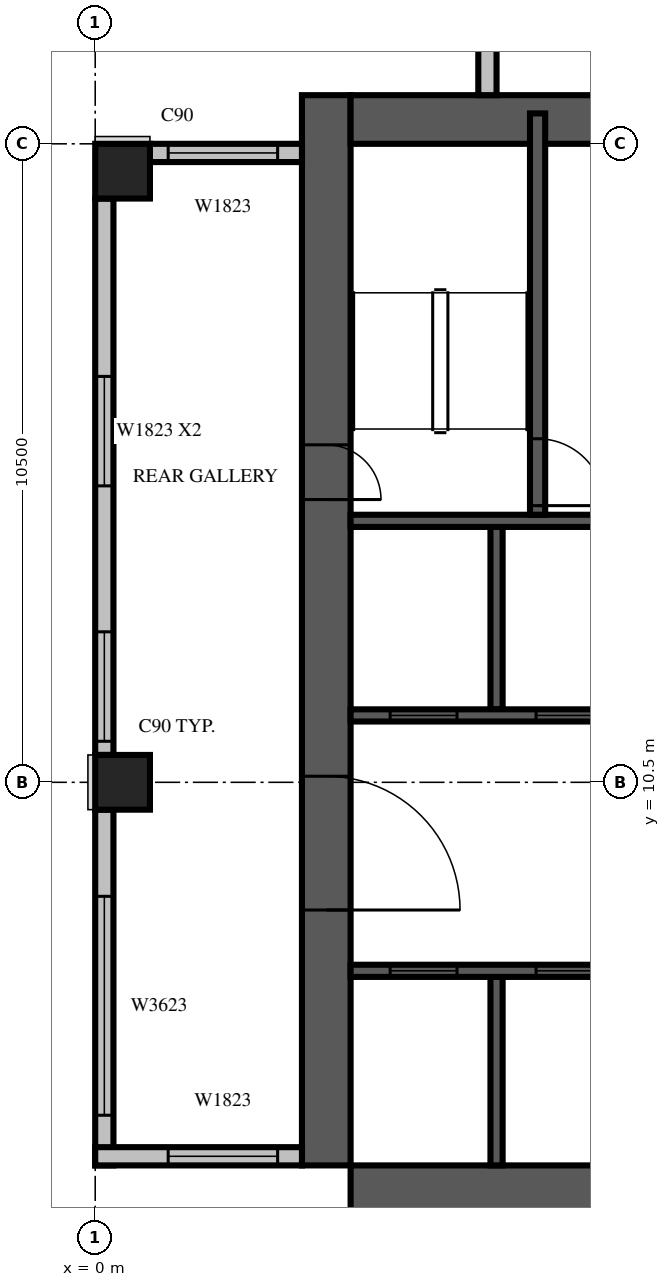
"""IFC4 building model, lengths in metres.
Left out: names, types, materials, properties, quantities, classifications, styles, units other than length and angle.
Written with IfcOpenShell. Run it as: python <this file> out.ifc"""

import sys

from ifc_helpers import new_model, si_unit, direction, frame, frame_2d, origin, origin_2d, place, context, subcontext, project, spatial, rectangle, extrude, source, transform, mapped, element, fill, save


model = new_model("IFC4")
c1 = context("Model", 3, precision=1e-05, world=origin(), true_north=direction((0.0, 1.0)))
c2 = subcontext(c1, "Body", "Model", "MODEL_VIEW")
j1 = project(units=[si_unit("LENGTHUNIT", "METRE"), si_unit("PLANEANGLEUNIT", "RADIAN")], contexts=[c1])
p1 = place(None, origin())
s1 = spatial("IfcSite", under=j1, at=p1, CompositionType="ELEMENT")
p2 = place(p1, origin())
s2 = spatial("IfcBuilding", under=s1, at=p2, CompositionType="ELEMENT")
p3 = place(p2, frame((0.0, 0.0, 181.6)))
s3 = spatial("IfcBuildingStorey", under=s2, at=p3, CompositionType="ELEMENT", Elevation=181.6)
m1 = source(origin(), c2, "Body", "SweptSolid", [
    extrude(rectangle(XDim=0.9, YDim=0.9, at=origin_2d()), origin(), (0.0, 0.0, 1.0), 3.8),
])
for number, where, z_axis, x_axis in (
    (1, (0.45, 10.5, 0.0), (0.0, 0.0, 1.0), (1.0, 0.0, 0.0)),
    (2, (0.45, 20.55, 0.0), (0.0, 0.0, 1.0), (1.0, 0.0, 0.0)),
):
    element("IfcColumn", number, at=place(p3, frame(where, z_axis=z_axis, x_axis=x_axis)), inside=s3, PredefinedType="COLUMN", context=c2, shape_type="MappedRepresentation", body=[
        mapped(m1, transform((0.0, 0.0, 0.0), scale=1.0)),
    ])
m2 = source(origin(), c2, "Body", "SweptSolid", [
    extrude(rectangle(XDim=17.6, YDim=0.8, at=frame_2d((8.8, 0.0))), origin(), (0.0, 0.0, 1.0), 3.8),
])
p4 = place(p3, frame((3.8, 4.2, 0.0), z_axis=(0.0, 0.0, 1.0), x_axis=(0.0, 1.0, 0.0)))
e3 = element("IfcWall", 3, at=p4, inside=s3, PredefinedType="SHEAR", context=c2, shape_type="MappedRepresentation", body=[
    mapped(m2, transform((0.0, 0.0, 0.0), scale=1.0)),
])
m3 = source(origin(), c2, "Body", "SweptSolid", [
    extrude(rectangle(XDim=2.2, YDim=2.1, at=frame_2d((1.1, 1.05))), frame((0.0, 0.41, 0.0), z_axis=(0.0, -1.0, 0.0), x_axis=(1.0, 0.0, 0.0)), (0.0, 0.0, 1.0), 0.82),
])
p5 = place(p4, frame((4.2, 0.0, 0.0)))
e4 = element("IfcOpeningElement", 4, at=p5, cuts=e3, PredefinedType="OPENING", context=c2, shape_type="MappedRepresentation", body=[
    mapped(m3, transform((0.0, 0.0, 0.0), scale=1.0)),
])
m4 = source(origin(), c2, "Body", "SweptSolid", [
    extrude(rectangle(XDim=0.9, YDim=2.1, at=frame_2d((0.45, 1.05))), frame((0.0, 0.41, 0.0), z_axis=(0.0, -1.0, 0.0), x_axis=(1.0, 0.0, 0.0)), (0.0, 0.0, 1.0), 0.82),
])
p6 = place(p4, frame((10.95, 0.0, 0.0)))
e5 = element("IfcOpeningElement", 5, at=p6, cuts=e3, PredefinedType="OPENING", context=c2, shape_type="MappedRepresentation", body=[
    mapped(m4, transform((0.0, 0.0, 0.0), scale=1.0)),
])
p7 = place(p3, frame((4.2, 3.8, 0.0), z_axis=(0.0, 0.0, 1.0), x_axis=(1.0, 0.0, 0.0)))
e6 = element("IfcWall", 6, at=p7, inside=s3, PredefinedType="SHEAR", context=c2, shape_type="MappedRepresentation", body=[
    mapped(m2, transform((0.0, 0.0, 0.0), scale=1.0)),
])
p8 = place(p7, frame((11.55, 0.0, 0.0)))
e7 = element("IfcOpeningElement", 7, at=p8, cuts=e6, PredefinedType="OPENING", context=c2, shape_type="MappedRepresentation", body=[
    mapped(m4, transform((0.0, 0.0, 0.0), scale=1.0)),
])
m5 = source(origin(), c2, "Body", "SweptSolid", [
    extrude(rectangle(XDim=16.8, YDim=0.8, at=frame_2d((8.4, 0.0))), origin(), (0.0, 0.0, 1.0), 3.8),
])
p9 = place(p3, frame((4.2, 21.4, 0.0), z_axis=(0.0, 0.0, 1.0), x_axis=(1.0, 0.0, 0.0)))
e8 = element("IfcWall", 8, at=p9, inside=s3, PredefinedType="SHEAR", context=c2, shape_type="MappedRepresentation", body=[
    mapped(m5, transform((0.0, 0.0, 0.0), scale=1.0)),
])
m6 = source(origin(), c2, "Body", "SweptSolid", [
    extrude(rectangle(XDim=1.2, YDim=2.1, at=frame_2d((0.6, 1.05))), frame((0.0, 0.41, 0.0), z_axis=(0.0, -1.0, 0.0), x_axis=(1.0, 0.0, 0.0)), (0.0, 0.0, 1.0), 0.82),
])
p10 = place(p9, frame((6.2, 0.0, 0.0)))
e9 = element("IfcOpeningElement", 9, at=p10, cuts=e8, PredefinedType="OPENING", context=c2, shape_type="MappedRepresentation", body=[
    mapped(m6, transform((0.0, 0.0, 0.0), scale=1.0)),
])
p11 = place(p3, frame((6.45, 30.4, 0.0), z_axis=(0.0, 0.0, 1.0), x_axis=(0.0, -1.0, 0.0)))
e10 = element("IfcWall", 10, at=p11, inside=s3, PredefinedType="STANDARD", context=c2, shape_type="SweptSolid", body=[
    extrude(rectangle(XDim=8.6, YDim=0.3, at=frame_2d((4.3, 0.0))), origin(), (0.0, 0.0, 1.0), 3.4),
])
m7 = source(origin(), c2, "Body", "SweptSolid", [
    extrude(rectangle(XDim=1.8, YDim=2.3, at=frame_2d((0.9, 1.15))), frame((0.0, 0.16, 0.0), z_axis=(0.0, -1.0, 0.0), x_axis=(1.0, 0.0, 0.0)), (0.0, 0.0, 1.0), 0.32),
])
p12 = place(p11, frame((1.438, 0.0, 0.6)))
e11 = element("IfcOpeningElement", 11, at=p12, cuts=e10, PredefinedType="OPENING", context=c2, shape_type="MappedRepresentation", body=[
    mapped(m7, transform((0.0, 0.0, 0.0), scale=1.0)),
])
m8 = source(origin(), c2, "Body", "SweptSolid", [
    extrude(rectangle(XDim=1.2, YDim=2.3, at=frame_2d((0.6, 1.15))), frame((0.0, 0.16, 0.0), z_axis=(0.0, -1.0, 0.0), x_axis=(1.0, 0.0, 0.0)), (0.0, 0.0, 1.0), 0.32),
])
p13 = place(p11, frame((5.013, 0.0, 0.6)))
e12 = element("IfcOpeningElement", 12, at=p13, cuts=e10, PredefinedType="OPENING", context=c2, shape_type="MappedRepresentation", body=[
    mapped(m8, transform((0.0, 0.0, 0.0), scale=1.0)),
])
m9 = source(origin(), c2, "Body", "SweptSolid", [
    extrude(rectangle(XDim=2.5, YDim=0.3, at=frame_2d((1.25, 0.0))), origin(), (0.0, 0.0, 1.0), 3.4),
])
p14 = place(p3, frame((3.4, 20.85, 0.0), z_axis=(0.0, 0.0, 1.0), x_axis=(-1.0, 0.0, 0.0)))
e13 = element("IfcWall", 13, at=p14, inside=s3, PredefinedType="STANDARD", context=c2, shape_type="MappedRepresentation", body=[
    mapped(m9, transform((0.0, 0.0, 0.0), scale=1.0)),
])
p15 = place(p14, frame((0.4, 0.0, 0.6)))
e14 = element("IfcOpeningElement", 14, at=p15, cuts=e13, PredefinedType="OPENING", context=c2, shape_type="MappedRepresentation", body=[
    mapped(m7, transform((0.0, 0.0, 0.0), scale=1.0)),
])
m10 = source(origin(), c2, "Body", "SweptSolid", [
    extrude(rectangle(XDim=9.15, YDim=0.3, at=frame_2d((4.575, 0.0))), origin(), (0.0, 0.0, 1.0), 3.4),
])
p16 = place(p3, frame((0.15, 20.1, 0.0), z_axis=(0.0, 0.0, 1.0), x_axis=(0.0, -1.0, 0.0)))
e15 = element("IfcWall", 15, at=p16, inside=s3, PredefinedType="STANDARD", context=c2, shape_type="MappedRepresentation", body=[
    mapped(m10, transform((0.0, 0.0, 0.0), scale=1.0)),
])
p17 = place(p16, frame((2.925, 0.0, 0.6)))
e16 = element("IfcOpeningElement", 16, at=p17, cuts=e15, PredefinedType="OPENING", context=c2, shape_type="MappedRepresentation", body=[
    mapped(m7, transform((0.0, 0.0, 0.0), scale=1.0)),
])
p18 = place(p16, frame((7.125, 0.0, 0.6)))
e17 = element("IfcOpeningElement", 17, at=p18, cuts=e15, PredefinedType="OPENING", context=c2, shape_type="MappedRepresentation", body=[
    mapped(m7, transform((0.0, 0.0, 0.0), scale=1.0)),
])
m11 = source(origin(), c2, "Body", "SweptSolid", [
    extrude(rectangle(XDim=5.85, YDim=0.3, at=frame_2d((2.925, 0.0))), origin(), (0.0, 0.0, 1.0), 3.4),
])
p19 = place(p3, frame((0.15, 10.05, 0.0), z_axis=(0.0, 0.0, 1.0), x_axis=(0.0, -1.0, 0.0)))
e18 = element("IfcWall", 18, at=p19, inside=s3, PredefinedType="STANDARD", context=c2, shape_type="MappedRepresentation", body=[
    mapped(m11, transform((0.0, 0.0, 0.0), scale=1.0)),
])
m12 = source(origin(), c2, "Body", "SweptSolid", [
    extrude(rectangle(XDim=3.6, YDim=2.3, at=frame_2d((1.8, 1.15))), frame((0.0, 0.16, 0.0), z_axis=(0.0, -1.0, 0.0), x_axis=(1.0, 0.0, 0.0)), (0.0, 0.0, 1.0), 0.32),
])
p20 = place(p19, frame((1.425, 0.0, 0.6)))
e19 = element("IfcOpeningElement", 19, at=p20, cuts=e18, PredefinedType="OPENING", context=c2, shape_type="MappedRepresentation", body=[
    mapped(m12, transform((0.0, 0.0, 0.0), scale=1.0)),
])
m13 = source(origin(), c2, "Body", "SweptSolid", [
    extrude(rectangle(XDim=3.4, YDim=0.3, at=frame_2d((1.7, 0.0))), origin(), (0.0, 0.0, 1.0), 3.4),
])
p21 = place(p3, frame((0.0, 4.35, 0.0), z_axis=(0.0, 0.0, 1.0), x_axis=(1.0, 0.0, 0.0)))
e20 = element("IfcWall", 20, at=p21, inside=s3, PredefinedType="STANDARD", context=c2, shape_type="MappedRepresentation", body=[
    mapped(m13, transform((0.0, 0.0, 0.0), scale=1.0)),
])
p22 = place(p21, frame((1.2, 0.0, 0.6)))
e21 = element("IfcOpeningElement", 21, at=p22, cuts=e20, PredefinedType="OPENING", context=c2, shape_type="MappedRepresentation", body=[
    mapped(m7, transform((0.0, 0.0, 0.0), scale=1.0)),
])
m14 = source(origin(), c2, "Body", "SweptSolid", [
    extrude(rectangle(XDim=3.1, YDim=0.2, at=frame_2d((1.55, 0.0))), origin(), (0.0, 0.0, 1.0), 3.8),
])
p23 = place(p3, frame((6.6, 4.2, 0.0), z_axis=(0.0, 0.0, 1.0), x_axis=(0.0, 1.0, 0.0)))
e22 = element("IfcWall", 22, at=p23, inside=s3, PredefinedType="SOLIDWALL", context=c2, shape_type="MappedRepresentation", body=[
    mapped(m14, transform((0.0, 0.0, 0.0), scale=1.0)),
])
m15 = source(origin(), c2, "Body", "SweptSolid", [
    extrude(rectangle(XDim=3.0, YDim=0.2, at=frame_2d((1.5, 0.0))), origin(), (0.0, 0.0, 1.0), 3.8),
])
p24 = place(p3, frame((6.6, 11.7, 0.0), z_axis=(0.0, 0.0, 1.0), x_axis=(0.0, 1.0, 0.0)))
e23 = element("IfcWall", 23, at=p24, inside=s3, PredefinedType="SOLIDWALL", context=c2, shape_type="MappedRepresentation", body=[
    mapped(m15, transform((0.0, 0.0, 0.0), scale=1.0)),
])
m16 = source(origin(), c2, "Body", "SweptSolid", [
    extrude(rectangle(XDim=9.6, YDim=0.2, at=frame_2d((4.8, 0.0))), origin(), (0.0, 0.0, 1.0), 3.8),
])
p25 = place(p3, frame((4.2, 7.4, 0.0), z_axis=(0.0, 0.0, 1.0), x_axis=(1.0, 0.0, 0.0)))
e24 = element("IfcWall", 24, at=p25, inside=s3, PredefinedType="SOLIDWALL", context=c2, shape_type="MappedRepresentation", body=[
    mapped(m16, transform((0.0, 0.0, 0.0), scale=1.0)),
])
m17 = source(origin(), c2, "Body", "SweptSolid", [
    extrude(rectangle(XDim=1.1, YDim=2.1, at=frame_2d((0.55, 1.05))), frame((0.0, 0.11, 0.0), z_axis=(0.0, -1.0, 0.0), x_axis=(1.0, 0.0, 0.0)), (0.0, 0.0, 1.0), 0.22),
])
p26 = place(p25, frame((0.65, 0.0, 0.0)))
e25 = element("IfcOpeningElement", 25, at=p26, cuts=e24, PredefinedType="OPENING", context=c2, shape_type="MappedRepresentation", body=[
    mapped(m17, transform((0.0, 0.0, 0.0), scale=1.0)),
])
p27 = place(p25, frame((3.05, 0.0, 0.0)))
e26 = element("IfcOpeningElement", 26, at=p27, cuts=e24, PredefinedType="OPENING", context=c2, shape_type="MappedRepresentation", body=[
    mapped(m17, transform((0.0, 0.0, 0.0), scale=1.0)),
])
p28 = place(p25, frame((5.45, 0.0, 0.0)))
e27 = element("IfcOpeningElement", 27, at=p28, cuts=e24, PredefinedType="OPENING", context=c2, shape_type="MappedRepresentation", body=[
    mapped(m17, transform((0.0, 0.0, 0.0), scale=1.0)),
])
p29 = place(p25, frame((7.85, 0.0, 0.0)))
e28 = element("IfcOpeningElement", 28, at=p29, cuts=e24, PredefinedType="OPENING", context=c2, shape_type="MappedRepresentation", body=[
    mapped(m17, transform((0.0, 0.0, 0.0), scale=1.0)),
])
m18 = source(origin(), c2, "Body", "SweptSolid", [
    extrude(rectangle(XDim=4.8, YDim=0.2, at=frame_2d((2.4, 0.0))), origin(), (0.0, 0.0, 1.0), 3.8),
])
p30 = place(p3, frame((4.2, 11.6, 0.0), z_axis=(0.0, 0.0, 1.0), x_axis=(1.0, 0.0, 0.0)))
e29 = element("IfcWall", 29, at=p30, inside=s3, PredefinedType="SOLIDWALL", context=c2, shape_type="MappedRepresentation", body=[
    mapped(m18, transform((0.0, 0.0, 0.0), scale=1.0)),
])
p31 = place(p30, frame((0.65, 0.0, 0.0)))
e30 = element("IfcOpeningElement", 30, at=p31, cuts=e29, PredefinedType="OPENING", context=c2, shape_type="MappedRepresentation", body=[
    mapped(m17, transform((0.0, 0.0, 0.0), scale=1.0)),
])
p32 = place(p30, frame((3.05, 0.0, 0.0)))
e31 = element("IfcOpeningElement", 31, at=p32, cuts=e29, PredefinedType="OPENING", context=c2, shape_type="MappedRepresentation", body=[
    mapped(m17, transform((0.0, 0.0, 0.0), scale=1.0)),
])
p33 = place(p3, frame((4.2, 14.8, 0.0), z_axis=(0.0, 0.0, 1.0), x_axis=(1.0, 0.0, 0.0)))
e32 = element("IfcWall", 32, at=p33, inside=s3, PredefinedType="SOLIDWALL", context=c2, shape_type="MappedRepresentation", body=[
    mapped(m18, transform((0.0, 0.0, 0.0), scale=1.0)),
])
m19 = source(origin(), c2, "Body", "SweptSolid", [
    extrude(rectangle(XDim=6.6, YDim=0.25, at=frame_2d((3.3, 0.0))), origin(), (0.0, 0.0, 1.0), 3.4),
])
p34 = place(p3, frame((7.275, 14.9, 0.0), z_axis=(0.0, 0.0, 1.0), x_axis=(0.0, 1.0, 0.0)))
e33 = element("IfcWall", 33, at=p34, inside=s3, PredefinedType="SOLIDWALL", context=c2, shape_type="MappedRepresentation", body=[
    mapped(m19, transform((0.0, 0.0, 0.0), scale=1.0)),
])
m20 = source(origin(), c2, "Body", "SweptSolid", [
    extrude(rectangle(XDim=1.1, YDim=2.1, at=frame_2d((0.55, 1.05))), frame((0.0, 0.135, 0.0), z_axis=(0.0, -1.0, 0.0), x_axis=(1.0, 0.0, 0.0)), (0.0, 0.0, 1.0), 0.27),
])
p35 = place(p34, frame((0.15, 0.0, 0.0)))
e34 = element("IfcOpeningElement", 34, at=p35, cuts=e33, PredefinedType="OPENING", context=c2, shape_type="MappedRepresentation", body=[
    mapped(m20, transform((0.0, 0.0, 0.0), scale=1.0)),
])
m21 = source(origin(), c2, "Body", "SweptSolid", [
    extrude(rectangle(XDim=1.8, YDim=2.3, at=frame_2d((0.9, 1.15))), frame((0.0, 0.03, 0.0), z_axis=(0.0, -1.0, 0.0), x_axis=(1.0, 0.0, 0.0)), (0.0, 0.0, 1.0), 0.06),
])
p36 = place(p15, origin())
e35 = element("IfcWindow", 35, at=p36, inside=s3, PartitioningType="SINGLE_PANEL", PredefinedType="WINDOW", context=c2, shape_type="MappedRepresentation", body=[
    mapped(m21, transform((0.0, 0.0, 0.0), scale=1.0)),
])
fill(e14, e35)
p37 = place(p17, origin())
e36 = element("IfcWindow", 36, at=p37, inside=s3, PartitioningType="SINGLE_PANEL", PredefinedType="WINDOW", context=c2, shape_type="MappedRepresentation", body=[
    mapped(m21, transform((0.0, 0.0, 0.0), scale=1.0)),
])
fill(e16, e36)
p38 = place(p18, origin())
e37 = element("IfcWindow", 37, at=p38, inside=s3, PartitioningType="SINGLE_PANEL", PredefinedType="WINDOW", context=c2, shape_type="MappedRepresentation", body=[
    mapped(m21, transform((0.0, 0.0, 0.0), scale=1.0)),
])
fill(e17, e37)
m22 = source(origin(), c2, "Body", "SweptSolid", [
    extrude(rectangle(XDim=3.6, YDim=2.3, at=frame_2d((1.8, 1.15))), frame((0.0, 0.03, 0.0), z_axis=(0.0, -1.0, 0.0), x_axis=(1.0, 0.0, 0.0)), (0.0, 0.0, 1.0), 0.06),
])
p39 = place(p20, origin())
e38 = element("IfcWindow", 38, at=p39, inside=s3, PartitioningType="SINGLE_PANEL", PredefinedType="WINDOW", context=c2, shape_type="MappedRepresentation", body=[
    mapped(m22, transform((0.0, 0.0, 0.0), scale=1.0)),
])
fill(e19, e38)
p40 = place(p22, origin())
e39 = element("IfcWindow", 39, at=p40, inside=s3, PartitioningType="SINGLE_PANEL", PredefinedType="WINDOW", context=c2, shape_type="MappedRepresentation", body=[
    mapped(m21, transform((0.0, 0.0, 0.0), scale=1.0)),
])
fill(e21, e39)
m23 = source(origin(), c2, "Body", "SweptSolid", [
    extrude(rectangle(XDim=1.1, YDim=2.1, at=frame_2d((0.55, 1.05))), frame((0.0, 0.025, 0.0), z_axis=(0.0, -1.0, 0.0), x_axis=(1.0, 0.0, 0.0)), (0.0, 0.0, 1.0), 0.05),
])
p41 = place(p26, origin())
e40 = element("IfcDoor", 40, at=p41, inside=s3, OperationType="SLIDING_TO_LEFT", PredefinedType="DOOR", context=c2, shape_type="MappedRepresentation", body=[
    mapped(m23, transform((0.0, 0.0, 0.0), scale=1.0)),
])
fill(e25, e40)
p42 = place(p27, origin())
e41 = element("IfcDoor", 41, at=p42, inside=s3, OperationType="SLIDING_TO_LEFT", PredefinedType="DOOR", context=c2, shape_type="MappedRepresentation", body=[
    mapped(m23, transform((0.0, 0.0, 0.0), scale=1.0)),
])
fill(e26, e41)
p43 = place(p31, origin())
e42 = element("IfcDoor", 42, at=p43, inside=s3, OperationType="SLIDING_TO_LEFT", PredefinedType="DOOR", context=c2, shape_type="MappedRepresentation", body=[
    mapped(m23, transform((0.0, 0.0, 0.0), scale=1.0)),
])
fill(e30, e42)
p44 = place(p32, origin())
e43 = element("IfcDoor", 43, at=p44, inside=s3, OperationType="SLIDING_TO_LEFT", PredefinedType="DOOR", context=c2, shape_type="MappedRepresentation", body=[
    mapped(m23, transform((0.0, 0.0, 0.0), scale=1.0)),
])
fill(e31, e43)
p45 = place(p35, origin())
e44 = element("IfcDoor", 44, at=p45, inside=s3, OperationType="SINGLE_SWING_RIGHT", PredefinedType="DOOR", context=c2, shape_type="MappedRepresentation", body=[
    mapped(m23, transform((0.0, 0.0, 0.0), scale=1.0)),
])
fill(e34, e44)
m24 = source(origin(), c2, "Body", "SweptSolid", [
    extrude(rectangle(XDim=2.2, YDim=2.1, at=frame_2d((1.1, 1.05))), frame((0.0, 0.025, 0.0), z_axis=(0.0, -1.0, 0.0), x_axis=(1.0, 0.0, 0.0)), (0.0, 0.0, 1.0), 0.05),
])
p46 = place(p5, origin())
e45 = element("IfcDoor", 45, at=p46, inside=s3, OperationType="DOUBLE_DOOR_SINGLE_SWING", PredefinedType="DOOR", context=c2, shape_type="MappedRepresentation", body=[
    mapped(m24, transform((0.0, 0.0, 0.0), scale=1.0)),
])
fill(e4, e45)
m25 = source(origin(), c2, "Body", "SweptSolid", [
    extrude(rectangle(XDim=0.9, YDim=2.1, at=frame_2d((0.45, 1.05))), frame((0.0, 0.025, 0.0), z_axis=(0.0, -1.0, 0.0), x_axis=(1.0, 0.0, 0.0)), (0.0, 0.0, 1.0), 0.05),
])
p47 = place(p6, origin())
e46 = element("IfcDoor", 46, at=p47, inside=s3, OperationType="SINGLE_SWING_RIGHT", PredefinedType="DOOR", context=c2, shape_type="MappedRepresentation", body=[
    mapped(m25, transform((0.0, 0.0, 0.0), scale=1.0)),
])
fill(e5, e46)
save(model, sys.argv[1])
